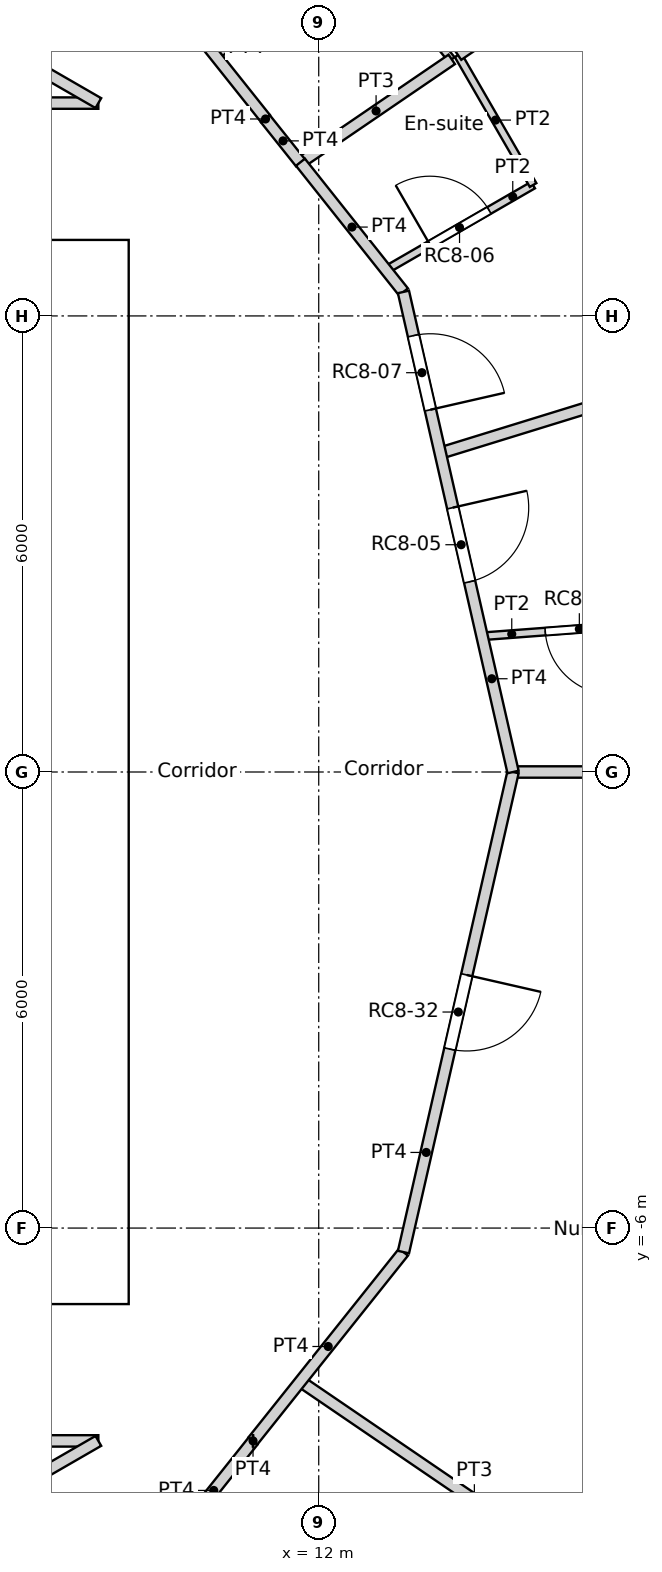
"""IFC4 building model, lengths in metres.
Left out: names, types, materials, properties, quantities, classifications, styles, units other than length and angle.
Written with IfcOpenShell. Run it as: python <this file> out.ifc"""

import sys

from ifc_helpers import new_model, si_unit, direction, frame, frame_2d, origin, place, context, subcontext, project, spatial, rectangle, extrude, element, fill, save


model = new_model("IFC4")
c1 = context("Model", 3, precision=1e-05, world=origin(), true_north=direction((0.0, 1.0)))
c2 = subcontext(c1, "Body", "Model", "MODEL_VIEW")
j1 = project(units=[si_unit("LENGTHUNIT", "METRE"), si_unit("PLANEANGLEUNIT", "RADIAN")], contexts=[c1])
p1 = place(None, origin())
s1 = spatial("IfcSite", under=j1, at=p1, CompositionType="ELEMENT")
p2 = place(p1, origin())
s2 = spatial("IfcBuilding", under=s1, at=p2, CompositionType="ELEMENT")
p3 = place(p2, frame((0.0, 0.0, 305.4)))
s3 = spatial("IfcBuildingStorey", under=s2, at=p3, CompositionType="ELEMENT", Elevation=305.4)
p4 = place(p3, frame((-9.5, -6.7, 0.0), z_axis=(0.0, 0.0, 1.0), x_axis=(1.0, 0.0, 0.0)))
e1 = element("IfcWall", 1, at=p4, inside=s3, PredefinedType="SOLIDWALL", context=c2, shape_type="SweptSolid", body=[
    extrude(rectangle(XDim=19.0, YDim=0.6, at=frame_2d((9.5, 0.0))), origin(), (0.0, 0.0, 1.0), 3.6),
])
p5 = place(p4, frame((10.4, 0.0, 0.0)))
e2 = element("IfcOpeningElement", 2, at=p5, cuts=e1, PredefinedType="OPENING", context=c2, shape_type="SweptSolid", body=[
    extrude(rectangle(XDim=1.0, YDim=2.1, at=frame_2d((0.5, 1.05))), frame((0.0, 0.3, 0.0), z_axis=(0.0, -1.0, 0.0), x_axis=(1.0, 0.0, 0.0)), (0.0, 0.0, 1.0), 0.6),
])
p6 = place(p4, frame((5.35, 0.0, 0.0)))
e3 = element("IfcOpeningElement", 3, at=p6, cuts=e1, PredefinedType="OPENING", context=c2, shape_type="SweptSolid", body=[
    extrude(rectangle(XDim=1.7, YDim=2.1, at=frame_2d((0.85, 1.05))), frame((0.0, 0.3, 0.0), z_axis=(0.0, -1.0, 0.0), x_axis=(1.0, 0.0, 0.0)), (0.0, 0.0, 1.0), 0.6),
])
p7 = place(p4, frame((11.95, 0.0, 0.0)))
e4 = element("IfcOpeningElement", 4, at=p7, cuts=e1, PredefinedType="OPENING", context=c2, shape_type="SweptSolid", body=[
    extrude(rectangle(XDim=1.7, YDim=2.1, at=frame_2d((0.85, 1.05))), frame((0.0, 0.3, 0.0), z_axis=(0.0, -1.0, 0.0), x_axis=(1.0, 0.0, 0.0)), (0.0, 0.0, 1.0), 0.6),
])
p8 = place(p3, frame((-9.5, 6.7, 0.0), z_axis=(0.0, 0.0, 1.0), x_axis=(1.0, 0.0, 0.0)))
e5 = element("IfcWall", 5, at=p8, inside=s3, PredefinedType="SOLIDWALL", context=c2, shape_type="SweptSolid", body=[
    extrude(rectangle(XDim=19.0, YDim=0.6, at=frame_2d((9.5, 0.0))), origin(), (0.0, 0.0, 1.0), 3.6),
])
p9 = place(p8, frame((5.35, 0.0, 0.0)))
e6 = element("IfcOpeningElement", 6, at=p9, cuts=e5, PredefinedType="OPENING", context=c2, shape_type="SweptSolid", body=[
    extrude(rectangle(XDim=1.7, YDim=2.1, at=frame_2d((0.85, 1.05))), frame((0.0, 0.3, 0.0), z_axis=(0.0, -1.0, 0.0), x_axis=(1.0, 0.0, 0.0)), (0.0, 0.0, 1.0), 0.6),
])
p10 = place(p3, frame((9.2, -6.4, 0.0), z_axis=(0.0, 0.0, 1.0), x_axis=(0.0, 1.0, 0.0)))
e7 = element("IfcWall", 7, at=p10, inside=s3, PredefinedType="SOLIDWALL", context=c2, shape_type="SweptSolid", body=[
    extrude(rectangle(XDim=12.8, YDim=0.6, at=frame_2d((6.4, 0.0))), origin(), (0.0, 0.0, 1.0), 3.6),
])
p11 = place(p10, frame((6.4, 0.0, 0.0)))
e8 = element("IfcOpeningElement", 8, at=p11, cuts=e7, PredefinedType="OPENING", context=c2, shape_type="SweptSolid", body=[
    extrude(rectangle(XDim=1.8, YDim=2.1, at=frame_2d((0.9, 1.05))), frame((0.0, 0.3, 0.0), z_axis=(0.0, -1.0, 0.0), x_axis=(1.0, 0.0, 0.0)), (0.0, 0.0, 1.0), 0.6),
])
p12 = place(p3, frame((2.1, -3.1, 0.0), z_axis=(0.0, 0.0, 1.0), x_axis=(1.0, 0.0, 0.0)))
e9 = element("IfcWall", 9, at=p12, inside=s3, PredefinedType="SOLIDWALL", context=c2, shape_type="SweptSolid", body=[
    extrude(rectangle(XDim=6.8, YDim=0.3, at=frame_2d((3.4, 0.0))), origin(), (0.0, 0.0, 1.0), 3.25),
])
p13 = place(p12, frame((0.35, 0.0, 0.0)))
e10 = element("IfcOpeningElement", 10, at=p13, cuts=e9, PredefinedType="OPENING", context=c2, shape_type="SweptSolid", body=[
    extrude(rectangle(XDim=1.7, YDim=2.1, at=frame_2d((0.85, 1.05))), frame((0.0, 0.15, 0.0), z_axis=(0.0, -1.0, 0.0), x_axis=(1.0, 0.0, 0.0)), (0.0, 0.0, 1.0), 0.3),
])
p14 = place(p3, frame((-4.35, 3.1, 0.0), z_axis=(0.0, 0.0, 1.0), x_axis=(1.0, 0.0, 0.0)))
e11 = element("IfcWall", 11, at=p14, inside=s3, PredefinedType="SOLIDWALL", context=c2, shape_type="SweptSolid", body=[
    extrude(rectangle(XDim=13.25, YDim=0.3, at=frame_2d((6.625, 0.0))), origin(), (0.0, 0.0, 1.0), 3.25),
])
p15 = place(p14, frame((2.95, 0.0, 0.0)))
e12 = element("IfcOpeningElement", 12, at=p15, cuts=e11, PredefinedType="OPENING", context=c2, shape_type="SweptSolid", body=[
    extrude(rectangle(XDim=1.1, YDim=2.1, at=frame_2d((0.55, 1.05))), frame((0.0, 0.15, 0.0), z_axis=(0.0, -1.0, 0.0), x_axis=(1.0, 0.0, 0.0)), (0.0, 0.0, 1.0), 0.3),
])
p16 = place(p14, frame((5.75, 0.0, 0.0)))
e13 = element("IfcOpeningElement", 13, at=p16, cuts=e11, PredefinedType="OPENING", context=c2, shape_type="SweptSolid", body=[
    extrude(rectangle(XDim=1.1, YDim=2.1, at=frame_2d((0.55, 1.05))), frame((0.0, 0.15, 0.0), z_axis=(0.0, -1.0, 0.0), x_axis=(1.0, 0.0, 0.0)), (0.0, 0.0, 1.0), 0.3),
])
p17 = place(p14, frame((8.55, 0.0, 0.0)))
e14 = element("IfcOpeningElement", 14, at=p17, cuts=e11, PredefinedType="OPENING", context=c2, shape_type="SweptSolid", body=[
    extrude(rectangle(XDim=1.1, YDim=2.1, at=frame_2d((0.55, 1.05))), frame((0.0, 0.15, 0.0), z_axis=(0.0, -1.0, 0.0), x_axis=(1.0, 0.0, 0.0)), (0.0, 0.0, 1.0), 0.3),
])
p18 = place(p3, frame((4.225, -0.425, 0.0), z_axis=(0.0, 0.0, 1.0), x_axis=(1.0, 0.0, 0.0)))
e15 = element("IfcWall", 15, at=p18, inside=s3, PredefinedType="SOLIDWALL", context=c2, shape_type="SweptSolid", body=[
    extrude(rectangle(XDim=4.675, YDim=0.15, at=frame_2d((2.337, 0.0))), origin(), (0.0, 0.0, 1.0), 3.25),
])
p19 = place(p18, frame((0.35, 0.0, 0.0)))
e16 = element("IfcOpeningElement", 16, at=p19, cuts=e15, PredefinedType="OPENING", context=c2, shape_type="SweptSolid", body=[
    extrude(rectangle(XDim=0.9, YDim=2.1, at=frame_2d((0.45, 1.05))), frame((0.0, 0.075, 0.0), z_axis=(0.0, -1.0, 0.0), x_axis=(1.0, 0.0, 0.0)), (0.0, 0.0, 1.0), 0.15),
])
p20 = place(p18, frame((2.0, 0.0, 0.0)))
e17 = element("IfcOpeningElement", 17, at=p20, cuts=e15, PredefinedType="OPENING", context=c2, shape_type="SweptSolid", body=[
    extrude(rectangle(XDim=0.9, YDim=2.1, at=frame_2d((0.45, 1.05))), frame((0.0, 0.075, 0.0), z_axis=(0.0, -1.0, 0.0), x_axis=(1.0, 0.0, 0.0)), (0.0, 0.0, 1.0), 0.15),
])
p21 = place(p18, frame((3.613, 0.0, 0.0)))
e18 = element("IfcOpeningElement", 18, at=p21, cuts=e15, PredefinedType="OPENING", context=c2, shape_type="SweptSolid", body=[
    extrude(rectangle(XDim=0.9, YDim=2.1, at=frame_2d((0.45, 1.05))), frame((0.0, 0.075, 0.0), z_axis=(0.0, -1.0, 0.0), x_axis=(1.0, 0.0, 0.0)), (0.0, 0.0, 1.0), 0.15),
])
p22 = place(p3, frame((0.896, 8.8, 0.0), z_axis=(0.0, 0.0, 1.0), x_axis=(1.0, 0.0, 0.0)))
e19 = element("IfcWall", 19, at=p22, inside=s3, PredefinedType="PARTITIONING", context=c2, shape_type="SweptSolid", body=[
    extrude(rectangle(XDim=8.205, YDim=0.15, at=frame_2d((4.102, 0.0))), origin(), (0.0, 0.0, 1.0), 3.25),
])
p23 = place(p22, frame((3.598, 0.0, 0.0)))
e20 = element("IfcOpeningElement", 20, at=p23, cuts=e19, PredefinedType="OPENING", context=c2, shape_type="SweptSolid", body=[
    extrude(rectangle(XDim=1.0, YDim=2.04, at=frame_2d((0.5, 1.02))), frame((0.0, 0.075, 0.0), z_axis=(0.0, -1.0, 0.0), x_axis=(1.0, 0.0, 0.0)), (0.0, 0.0, 1.0), 0.15),
])
p24 = place(p3, frame((9.079, 11.384, 0.0), z_axis=(0.0, 0.0, 1.0), x_axis=(0.623165080354, -0.782090328944, 0.0)))
e21 = element("IfcWall", 21, at=p24, inside=s3, PredefinedType="PARTITIONING", context=c2, shape_type="SweptSolid", body=[
    extrude(rectangle(XDim=3.564, YDim=0.15, at=frame_2d((1.782, 0.0))), origin(), (0.0, 0.0, 1.0), 3.25),
])
p25 = place(p24, frame((0.32, 0.0, 0.0)))
e22 = element("IfcOpeningElement", 22, at=p25, cuts=e21, PredefinedType="OPENING", context=c2, shape_type="SweptSolid", body=[
    extrude(rectangle(XDim=1.0, YDim=2.1, at=frame_2d((0.5, 1.05))), frame((0.0, 0.075, 0.0), z_axis=(0.0, -1.0, 0.0), x_axis=(1.0, 0.0, 0.0)), (0.0, 0.0, 1.0), 0.15),
])
p26 = place(p3, frame((11.3, 8.586, 0.0), z_axis=(0.0, 0.0, 1.0), x_axis=(0.0, 1.0, 0.0)))
e23 = element("IfcWall", 23, at=p26, inside=s3, PredefinedType="PARTITIONING", context=c2, shape_type="SweptSolid", body=[
    extrude(rectangle(XDim=0.01, YDim=0.15, at=frame_2d((0.005, 0.0))), origin(), (0.0, 0.0, 1.0), 3.25),
])
p27 = place(p3, frame((-9.092, -8.8, 0.0), z_axis=(0.0, 0.0, 1.0), x_axis=(1.0, 0.0, 0.0)))
e24 = element("IfcWall", 24, at=p27, inside=s3, PredefinedType="PARTITIONING", context=c2, shape_type="SweptSolid", body=[
    extrude(rectangle(XDim=18.193, YDim=0.15, at=frame_2d((9.096, 0.0))), origin(), (0.0, 0.0, 1.0), 3.25),
])
p28 = place(p27, frame((8.592, 0.0, 0.0)))
e25 = element("IfcOpeningElement", 25, at=p28, cuts=e24, PredefinedType="OPENING", context=c2, shape_type="SweptSolid", body=[
    extrude(rectangle(XDim=1.0, YDim=2.04, at=frame_2d((0.5, 1.02))), frame((0.0, 0.075, 0.0), z_axis=(0.0, -1.0, 0.0), x_axis=(1.0, 0.0, 0.0)), (0.0, 0.0, 1.0), 0.15),
])
p29 = place(p3, frame((11.137, -8.8, 0.0), z_axis=(0.0, 0.0, 1.0), x_axis=(-1.0, 0.0, 0.0)))
e26 = element("IfcWall", 26, at=p29, inside=s3, PredefinedType="PARTITIONING", context=c2, shape_type="SweptSolid", body=[
    extrude(rectangle(XDim=0.003, YDim=0.15, at=frame_2d((0.001, 0.0))), origin(), (0.0, 0.0, 1.0), 3.25),
])
p30 = place(p3, frame((10.101, -10.101, 0.0), z_axis=(0.0, 0.0, 1.0), x_axis=(0.623098344652, 0.782143498913, 0.0)))
e27 = element("IfcWall", 27, at=p30, inside=s3, PredefinedType="PARTITIONING", context=c2, shape_type="SweptSolid", body=[
    extrude(rectangle(XDim=1.661, YDim=0.15, at=frame_2d((0.831, 0.0))), origin(), (0.0, 0.0, 1.0), 3.25),
])
p31 = place(p3, frame((13.115, 6.316, 0.0), z_axis=(0.0, 0.0, 1.0), x_axis=(0.222568978642, -0.97491694505, 0.0)))
e28 = element("IfcWall", 28, at=p31, inside=s3, PredefinedType="PARTITIONING", context=c2, shape_type="SweptSolid", body=[
    extrude(rectangle(XDim=6.479, YDim=0.15, at=frame_2d((3.239, 0.0))), origin(), (0.0, 0.0, 1.0), 3.25),
])
p32 = place(p31, frame((2.911, 0.0, 0.0)))
e29 = element("IfcOpeningElement", 29, at=p32, cuts=e28, PredefinedType="OPENING", context=c2, shape_type="SweptSolid", body=[
    extrude(rectangle(XDim=1.0, YDim=2.1, at=frame_2d((0.5, 1.05))), frame((0.0, 0.075, 0.0), z_axis=(0.0, -1.0, 0.0), x_axis=(1.0, 0.0, 0.0)), (0.0, 0.0, 1.0), 0.15),
])
p33 = place(p31, frame((0.59, 0.0, 0.0)))
e30 = element("IfcOpeningElement", 30, at=p33, cuts=e28, PredefinedType="OPENING", context=c2, shape_type="SweptSolid", body=[
    extrude(rectangle(XDim=1.0, YDim=2.1, at=frame_2d((0.5, 1.05))), frame((0.0, 0.075, 0.0), z_axis=(0.0, -1.0, 0.0), x_axis=(1.0, 0.0, 0.0)), (0.0, 0.0, 1.0), 0.15),
])
p34 = place(p3, frame((11.76, 8.022, 0.0), z_axis=(0.0, 0.0, 1.0), x_axis=(0.62206805366, -0.782963177049, 0.0)))
e31 = element("IfcWall", 31, at=p34, inside=s3, PredefinedType="PARTITIONING", context=c2, shape_type="SweptSolid", body=[
    extrude(rectangle(XDim=2.179, YDim=0.15, at=frame_2d((1.089, 0.0))), origin(), (0.0, 0.0, 1.0), 3.25),
])
p35 = place(p3, frame((11.3, 8.592, 0.0), z_axis=(0.0, 0.0, 1.0), x_axis=(0.623405636383, -0.781898594785, 0.0)))
e32 = element("IfcWall", 32, at=p35, inside=s3, PredefinedType="PARTITIONING", context=c2, shape_type="SweptSolid", body=[
    extrude(rectangle(XDim=0.74, YDim=0.15, at=frame_2d((0.37, 0.0))), origin(), (0.0, 0.0, 1.0), 3.25),
])
p36 = place(p3, frame((11.134, -8.8, 0.0), z_axis=(0.0, 0.0, 1.0), x_axis=(0.623560523309, 0.781775078761, 0.0)))
e33 = element("IfcWall", 33, at=p36, inside=s3, PredefinedType="PARTITIONING", context=c2, shape_type="SweptSolid", body=[
    extrude(rectangle(XDim=3.177, YDim=0.15, at=frame_2d((1.589, 0.0))), origin(), (0.0, 0.0, 1.0), 3.25),
])
p37 = place(p3, frame((13.115, -6.316, 0.0), z_axis=(0.0, 0.0, 1.0), x_axis=(0.222568978642, 0.97491694505, 0.0)))
e34 = element("IfcWall", 34, at=p37, inside=s3, PredefinedType="PARTITIONING", context=c2, shape_type="SweptSolid", body=[
    extrude(rectangle(XDim=6.479, YDim=0.15, at=frame_2d((3.239, 0.0))), origin(), (0.0, 0.0, 1.0), 3.25),
])
p38 = place(p37, frame((2.74, 0.0, 0.0)))
e35 = element("IfcOpeningElement", 35, at=p38, cuts=e34, PredefinedType="OPENING", context=c2, shape_type="SweptSolid", body=[
    extrude(rectangle(XDim=1.0, YDim=2.04, at=frame_2d((0.5, 1.02))), frame((0.0, 0.075, 0.0), z_axis=(0.0, -1.0, 0.0), x_axis=(1.0, 0.0, 0.0)), (0.0, 0.0, 1.0), 0.15),
])
for number, where, z_axis, x_axis in (
    (36, (3.261, 12.171, 0.0), (0.0, 0.0, 1.0), (0.866, -0.5, 0.0)),
    (37, (3.261, -12.171, 0.0), (0.0, 0.0, 1.0), (0.866, 0.5, 0.0)),
):
    element("IfcWall", number, at=place(p3, frame(where, z_axis=z_axis, x_axis=x_axis)), inside=s3, PredefinedType="PARTITIONING", context=c2, shape_type="SweptSolid", body=[
        extrude(rectangle(XDim=6.743, YDim=0.15, at=frame_2d((3.371, 0.0))), origin(), (0.0, 0.0, 1.0), 3.25),
    ])
p39 = place(p3, frame((14.149, 1.785, 0.0), z_axis=(0.0, 0.0, 1.0), x_axis=(0.997193275785, 0.074870359477, 0.0)))
e38 = element("IfcWall", 38, at=p39, inside=s3, PredefinedType="PARTITIONING", context=c2, shape_type="SweptSolid", body=[
    extrude(rectangle(XDim=2.566, YDim=0.1, at=frame_2d((1.283, 0.0))), origin(), (0.0, 0.0, 1.0), 3.25),
])
p40 = place(p39, frame((0.833, 0.0, 0.0)))
e39 = element("IfcOpeningElement", 39, at=p40, cuts=e38, PredefinedType="OPENING", context=c2, shape_type="SweptSolid", body=[
    extrude(rectangle(XDim=0.9, YDim=2.04, at=frame_2d((0.45, 1.02))), frame((0.0, 0.05, 0.0), z_axis=(0.0, -1.0, 0.0), x_axis=(1.0, 0.0, 0.0)), (0.0, 0.0, 1.0), 0.1),
])
p41 = place(p3, frame((13.599, 4.195, 0.0), z_axis=(0.0, 0.0, 1.0), x_axis=(0.955580602693, 0.294729896274, 0.0)))
e40 = element("IfcWall", 40, at=p41, inside=s3, PredefinedType="PARTITIONING", context=c2, shape_type="SweptSolid", body=[
    extrude(rectangle(XDim=5.54, YDim=0.15, at=frame_2d((2.77, 0.0))), origin(), (0.0, 0.0, 1.0), 3.25),
])
p42 = place(p3, frame((14.557, 0.0, 0.0), z_axis=(0.0, 0.0, 1.0), x_axis=(1.0, 0.0, 0.0)))
e41 = element("IfcWall", 41, at=p42, inside=s3, PredefinedType="PARTITIONING", context=c2, shape_type="SweptSolid", body=[
    extrude(rectangle(XDim=5.214, YDim=0.15, at=frame_2d((2.607, 0.0))), origin(), (0.0, 0.0, 1.0), 3.25),
])
p43 = place(p3, frame((12.885, 6.605, 0.0), z_axis=(0.0, 0.0, 1.0), x_axis=(0.866076416361, 0.499911633214, 0.0)))
e42 = element("IfcWall", 42, at=p43, inside=s3, PredefinedType="PARTITIONING", context=c2, shape_type="SweptSolid", body=[
    extrude(rectangle(XDim=2.234, YDim=0.1, at=frame_2d((1.117, 0.0))), origin(), (0.0, 0.0, 1.0), 3.25),
])
p44 = place(p43, frame((0.667, 0.0, 0.0)))
e43 = element("IfcOpeningElement", 43, at=p44, cuts=e42, PredefinedType="OPENING", context=c2, shape_type="SweptSolid", body=[
    extrude(rectangle(XDim=0.9, YDim=2.04, at=frame_2d((0.45, 1.02))), frame((0.0, 0.05, 0.0), z_axis=(0.0, -1.0, 0.0), x_axis=(1.0, 0.0, 0.0)), (0.0, 0.0, 1.0), 0.1),
])
p45 = place(p3, frame((13.833, 9.431, 0.0), z_axis=(0.0, 0.0, 1.0), x_axis=(0.500143626598, -0.865942465048, 0.0)))
e44 = element("IfcWall", 44, at=p45, inside=s3, PredefinedType="PARTITIONING", context=c2, shape_type="SweptSolid", body=[
    extrude(rectangle(XDim=1.974, YDim=0.1, at=frame_2d((0.987, 0.0))), origin(), (0.0, 0.0, 1.0), 3.25),
])
p46 = place(p3, frame((13.833, 9.431, 0.0), z_axis=(0.0, 0.0, 1.0), x_axis=(0.826152320289, 0.56344684193, 0.0)))
e45 = element("IfcWall", 45, at=p46, inside=s3, PredefinedType="PARTITIONING", context=c2, shape_type="SweptSolid", body=[
    extrude(rectangle(XDim=3.03, YDim=0.15, at=frame_2d((1.515, 0.0))), origin(), (0.0, 0.0, 1.0), 3.25),
])
p47 = place(p3, frame((11.759, 8.017, 0.0), z_axis=(0.0, 0.0, 1.0), x_axis=(0.826143746222, 0.563459413426, 0.0)))
e46 = element("IfcWall", 46, at=p47, inside=s3, PredefinedType="PARTITIONING", context=c2, shape_type="SweptSolid", body=[
    extrude(rectangle(XDim=2.41, YDim=0.15, at=frame_2d((1.205, 0.0))), origin(), (0.0, 0.0, 1.0), 3.25),
])
p48 = place(p3, frame((12.522, 10.91, 0.0), z_axis=(0.0, 0.0, 1.0), x_axis=(0.623330716607, -0.781958322249, 0.0)))
e47 = element("IfcWall", 47, at=p48, inside=s3, PredefinedType="PARTITIONING", context=c2, shape_type="SweptSolid", body=[
    extrude(rectangle(XDim=1.965, YDim=0.1, at=frame_2d((0.983, 0.0))), origin(), (0.0, 0.0, 1.0), 3.25),
])
p49 = place(p3, frame((10.645, 9.413, 0.0), z_axis=(0.0, 0.0, 1.0), x_axis=(0.781830263661, 0.623491330191, 0.0)))
e48 = element("IfcWall", 48, at=p49, inside=s3, PredefinedType="PARTITIONING", context=c2, shape_type="SweptSolid", body=[
    extrude(rectangle(XDim=2.401, YDim=0.1, at=frame_2d((1.2, 0.0))), origin(), (0.0, 0.0, 1.0), 3.25),
])
p50 = place(p49, frame((0.751, 0.0, 0.0)))
e49 = element("IfcOpeningElement", 49, at=p50, cuts=e48, PredefinedType="OPENING", context=c2, shape_type="SweptSolid", body=[
    extrude(rectangle(XDim=0.9, YDim=2.04, at=frame_2d((0.45, 1.02))), frame((0.0, 0.05, 0.0), z_axis=(0.0, -1.0, 0.0), x_axis=(1.0, 0.0, 0.0)), (0.0, 0.0, 1.0), 0.1),
])
p51 = place(p3, frame((11.759, -8.017, 0.0), z_axis=(0.0, 0.0, 1.0), x_axis=(0.826207761897, -0.563365542238, 0.0)))
e50 = element("IfcWall", 50, at=p51, inside=s3, PredefinedType="PARTITIONING", context=c2, shape_type="SweptSolid", body=[
    extrude(rectangle(XDim=5.54, YDim=0.15, at=frame_2d((2.77, 0.0))), origin(), (0.0, 0.0, 1.0), 3.25),
])
p52 = place(p11, origin())
e51 = element("IfcDoor", 51, at=p52, inside=s3, OperationType="DOUBLE_DOOR_SINGLE_SWING", PredefinedType="DOOR", context=c2, shape_type="SweptSolid", body=[
    extrude(rectangle(XDim=1.8, YDim=2.1, at=frame_2d((0.9, 1.05))), frame((0.0, 0.025, 0.0), z_axis=(0.0, -1.0, 0.0), x_axis=(1.0, 0.0, 0.0)), (0.0, 0.0, 1.0), 0.05),
])
fill(e8, e51)
p53 = place(p21, origin())
e52 = element("IfcDoor", 52, at=p53, inside=s3, OperationType="SINGLE_SWING_RIGHT", PredefinedType="DOOR", context=c2, shape_type="SweptSolid", body=[
    extrude(rectangle(XDim=0.9, YDim=2.1, at=frame_2d((0.45, 1.05))), frame((0.0, 0.025, 0.0), z_axis=(0.0, -1.0, 0.0), x_axis=(1.0, 0.0, 0.0)), (0.0, 0.0, 1.0), 0.05),
])
fill(e18, e52)
p54 = place(p40, origin())
e53 = element("IfcDoor", 53, at=p54, inside=s3, OperationType="SINGLE_SWING_LEFT", PredefinedType="DOOR", context=c2, shape_type="SweptSolid", body=[
    extrude(rectangle(XDim=0.9, YDim=2.04, at=frame_2d((0.45, 1.02))), frame((0.0, 0.025, 0.0), z_axis=(0.0, -1.0, 0.0), x_axis=(1.0, 0.0, 0.0)), (0.0, 0.0, 1.0), 0.05),
])
fill(e39, e53)
p55 = place(p32, origin())
e54 = element("IfcDoor", 54, at=p55, inside=s3, OperationType="SINGLE_SWING_LEFT", PredefinedType="DOOR", context=c2, shape_type="SweptSolid", body=[
    extrude(rectangle(XDim=1.0, YDim=2.1, at=frame_2d((0.5, 1.05))), frame((0.0, 0.025, 0.0), z_axis=(0.0, -1.0, 0.0), x_axis=(1.0, 0.0, 0.0)), (0.0, 0.0, 1.0), 0.05),
])
fill(e29, e54)
p56 = place(p44, origin())
e55 = element("IfcDoor", 55, at=p56, inside=s3, OperationType="SINGLE_SWING_LEFT", PredefinedType="DOOR", context=c2, shape_type="SweptSolid", body=[
    extrude(rectangle(XDim=0.9, YDim=2.04, at=frame_2d((0.45, 1.02))), frame((0.0, 0.025, 0.0), z_axis=(0.0, -1.0, 0.0), x_axis=(1.0, 0.0, 0.0)), (0.0, 0.0, 1.0), 0.05),
])
fill(e43, e55)
p57 = place(p33, origin())
e56 = element("IfcDoor", 56, at=p57, inside=s3, OperationType="SINGLE_SWING_RIGHT", PredefinedType="DOOR", context=c2, shape_type="SweptSolid", body=[
    extrude(rectangle(XDim=1.0, YDim=2.1, at=frame_2d((0.5, 1.05))), frame((0.0, 0.025, 0.0), z_axis=(0.0, -1.0, 0.0), x_axis=(1.0, 0.0, 0.0)), (0.0, 0.0, 1.0), 0.05),
])
fill(e30, e56)
p58 = place(p38, origin())
e57 = element("IfcDoor", 57, at=p58, inside=s3, OperationType="SINGLE_SWING_LEFT", PredefinedType="DOOR", context=c2, shape_type="SweptSolid", body=[
    extrude(rectangle(XDim=1.0, YDim=2.04, at=frame_2d((0.5, 1.02))), frame((0.0, 0.025, 0.0), z_axis=(0.0, -1.0, 0.0), x_axis=(1.0, 0.0, 0.0)), (0.0, 0.0, 1.0), 0.05),
])
fill(e35, e57)
save(model, sys.argv[1])
